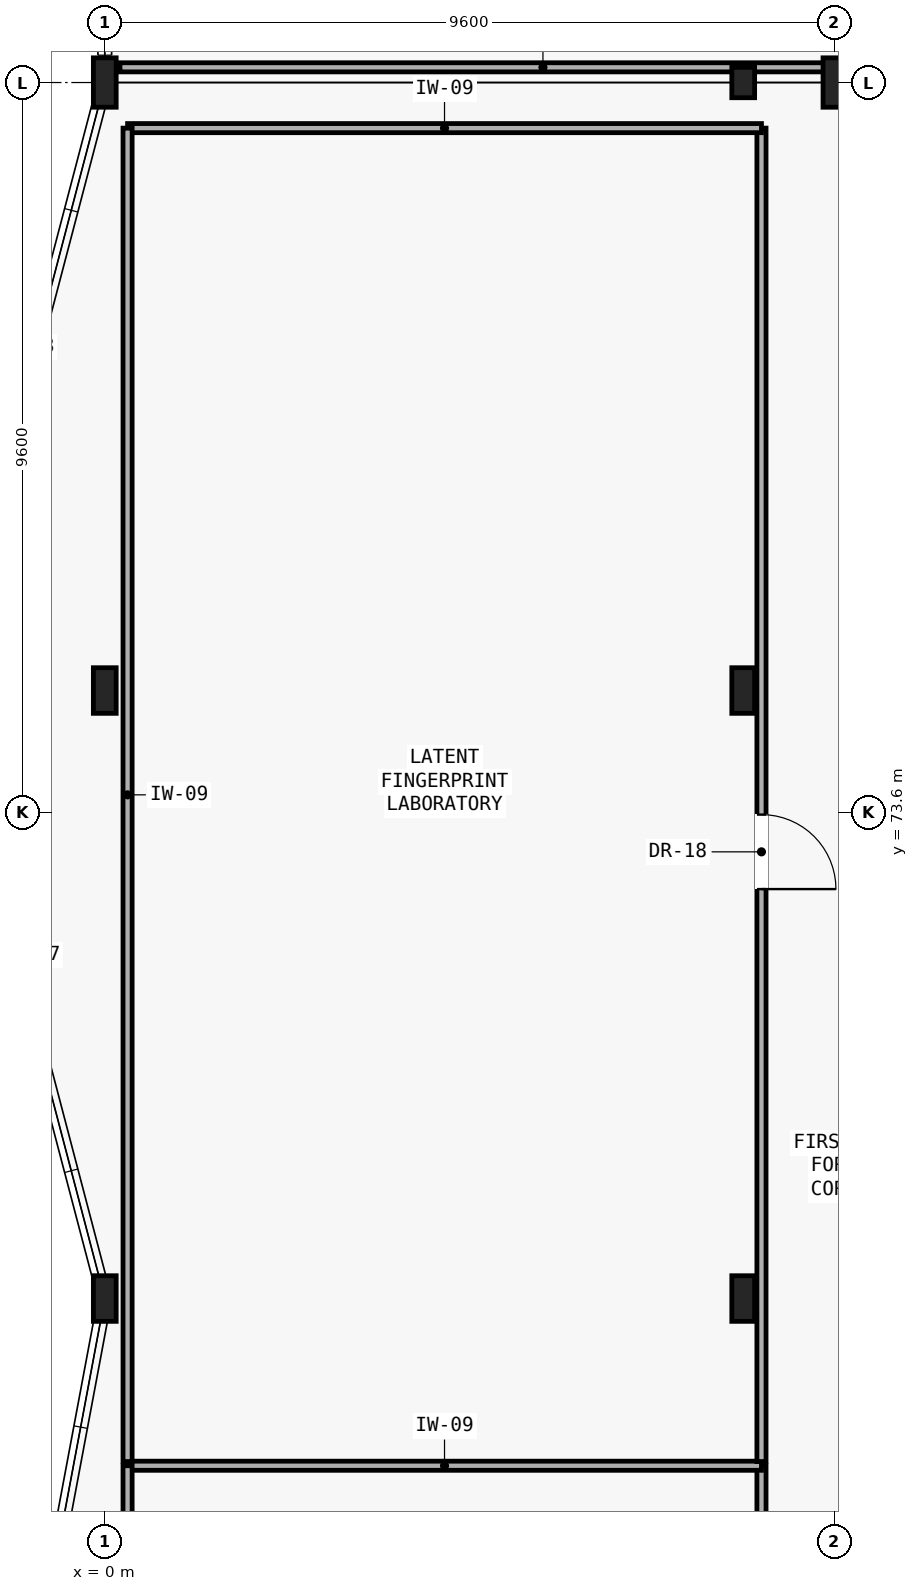
"""IFC4 building model, lengths in metres.
Left out: names, types, materials, properties, quantities, classifications, styles, units other than length and angle.
Written with IfcOpenShell. Run it as: python <this file> out.ifc"""

import sys

from ifc_helpers import new_model, si_unit, direction, frame, frame_2d, origin, origin_2d, place, context, subcontext, project, spatial, rectangle, i_section, extrude, element, fill, save


model = new_model("IFC4")
c1 = context("Model", 3, precision=1e-05, world=origin(), true_north=direction((0.0, 1.0)))
c2 = subcontext(c1, "Body", "Model", "MODEL_VIEW")
j1 = project(units=[si_unit("LENGTHUNIT", "METRE"), si_unit("PLANEANGLEUNIT", "RADIAN")], contexts=[c1])
p1 = place(None, origin())
s1 = spatial("IfcSite", under=j1, at=p1, CompositionType="ELEMENT")
p2 = place(p1, origin())
s2 = spatial("IfcBuilding", under=s1, at=p2, CompositionType="ELEMENT")
p3 = place(p2, frame((0.0, 0.0, 5.25)))
s3 = spatial("IfcBuildingStorey", under=s2, at=p3, CompositionType="ELEMENT", Elevation=5.25)
for number, where, z_axis, x_axis in (
    (1, (0.0, 83.2, 0.0), (0.0, 0.0, 1.0), (1.0, 0.0, 0.0)),
    (2, (9.6, 83.2, 0.0), (0.0, 0.0, 1.0), (1.0, 0.0, 0.0)),
):
    element("IfcColumn", number, at=place(p3, frame(where, z_axis=z_axis, x_axis=x_axis)), inside=s3, PredefinedType="COLUMN", context=c2, shape_type="SweptSolid", body=[
        extrude(i_section(OverallWidth=0.3, OverallDepth=0.65, WebThickness=0.016, FlangeThickness=0.031, FilletRadius=0.027, at=origin_2d()), origin(), (0.0, 0.0, 1.0), 4.2),
    ])
for number, where, z_axis, x_axis in (
    (3, (0.0, 67.2, 0.0), (0.0, 0.0, 1.0), (1.0, 0.0, 0.0)),
    (4, (8.4, 67.2, 0.0), (0.0, 0.0, 1.0), (1.0, 0.0, 0.0)),
    (5, (0.0, 75.2, 0.0), (0.0, 0.0, 1.0), (1.0, 0.0, 0.0)),
    (6, (8.4, 75.2, 0.0), (0.0, 0.0, 1.0), (1.0, 0.0, 0.0)),
):
    element("IfcColumn", number, at=place(p3, frame(where, z_axis=z_axis, x_axis=x_axis)), inside=s3, PredefinedType="COLUMN", context=c2, shape_type="SweptSolid", body=[
        extrude(i_section(OverallWidth=0.3, OverallDepth=0.6, WebThickness=0.015, FlangeThickness=0.03, FilletRadius=0.027, at=origin_2d()), origin(), (0.0, 0.0, 1.0), 4.2),
    ])
p4 = place(p3, frame((8.4, 83.2, 0.0), z_axis=(0.0, 0.0, 1.0), x_axis=(1.0, 0.0, 0.0)))
e7 = element("IfcColumn", 7, at=p4, inside=s3, PredefinedType="COLUMN", context=c2, shape_type="SweptSolid", body=[
    extrude(i_section(OverallWidth=0.3, OverallDepth=0.4, WebThickness=0.013, FlangeThickness=0.024, FilletRadius=0.027, at=origin_2d()), origin(), (0.0, 0.0, 1.0), 4.2),
])
p5 = place(p3, frame((0.2, 83.4, 0.0), z_axis=(0.0, 0.0, 1.0), x_axis=(1.0, 0.0, 0.0)))
e8 = element("IfcWall", 8, at=p5, inside=s3, PredefinedType="PARTITIONING", context=c2, shape_type="SweptSolid", body=[
    extrude(rectangle(XDim=15.9, YDim=0.12, at=frame_2d((7.95, 0.0))), origin(), (0.0, 0.0, 1.0), 3.14),
])
p6 = place(p3, frame((8.64, 48.25, 0.0), z_axis=(0.0, 0.0, 1.0), x_axis=(0.0, 1.0, 0.0)))
e9 = element("IfcWall", 9, at=p6, inside=s3, PredefinedType="PARTITIONING", context=c2, shape_type="SweptSolid", body=[
    extrude(rectangle(XDim=16.75, YDim=0.12, at=frame_2d((8.375, 0.0))), origin(), (0.0, 0.0, 1.0), 3.5),
])
p7 = place(p6, frame((6.865, 0.0, 0.0)))
e10 = element("IfcOpeningElement", 10, at=p7, cuts=e9, PredefinedType="OPENING", context=c2, shape_type="SweptSolid", body=[
    extrude(rectangle(XDim=1.02, YDim=2.1, at=frame_2d((0.51, 1.05))), frame((0.0, 0.07, 0.0), z_axis=(0.0, -1.0, 0.0), x_axis=(1.0, 0.0, 0.0)), (0.0, 0.0, 1.0), 0.14),
])
p8 = place(p3, frame((8.64, 65.0, 0.0), z_axis=(0.0, 0.0, 1.0), x_axis=(-1.0, 0.0, 0.0)))
e11 = element("IfcWall", 11, at=p8, inside=s3, PredefinedType="PARTITIONING", context=c2, shape_type="SweptSolid", body=[
    extrude(rectangle(XDim=8.34, YDim=0.12, at=frame_2d((4.17, 0.0))), origin(), (0.0, 0.0, 1.0), 3.96),
])
p9 = place(p3, frame((0.3, 65.0, 0.0), z_axis=(0.0, 0.0, 1.0), x_axis=(0.0, -1.0, 0.0)))
e12 = element("IfcWall", 12, at=p9, inside=s3, PredefinedType="PARTITIONING", context=c2, shape_type="SweptSolid", body=[
    extrude(rectangle(XDim=16.75, YDim=0.12, at=frame_2d((8.375, 0.0))), origin(), (0.0, 0.0, 1.0), 3.96),
])
p10 = place(p3, frame((8.64, 65.055, 0.0), z_axis=(0.0, 0.0, 1.0), x_axis=(0.0, 1.0, 0.0)))
e13 = element("IfcWall", 13, at=p10, inside=s3, PredefinedType="PARTITIONING", context=c2, shape_type="SweptSolid", body=[
    extrude(rectangle(XDim=17.545, YDim=0.12, at=frame_2d((8.772, 0.0))), origin(), (0.0, 0.0, 1.0), 3.5),
])
p11 = place(p10, frame((7.532, 0.0, 0.0)))
e14 = element("IfcOpeningElement", 14, at=p11, cuts=e13, PredefinedType="OPENING", context=c2, shape_type="SweptSolid", body=[
    extrude(rectangle(XDim=0.98, YDim=2.1, at=frame_2d((0.49, 1.05))), frame((0.0, 0.07, 0.0), z_axis=(0.0, -1.0, 0.0), x_axis=(1.0, 0.0, 0.0)), (0.0, 0.0, 1.0), 0.14),
])
p12 = place(p3, frame((8.64, 82.6, 0.0), z_axis=(0.0, 0.0, 1.0), x_axis=(-1.0, 0.0, 0.0)))
e15 = element("IfcWall", 15, at=p12, inside=s3, PredefinedType="PARTITIONING", context=c2, shape_type="SweptSolid", body=[
    extrude(rectangle(XDim=8.34, YDim=0.12, at=frame_2d((4.17, 0.0))), origin(), (0.0, 0.0, 1.0), 3.96),
])
p13 = place(p3, frame((0.3, 82.6, 0.0), z_axis=(0.0, 0.0, 1.0), x_axis=(0.0, -1.0, 0.0)))
e16 = element("IfcWall", 16, at=p13, inside=s3, PredefinedType="PARTITIONING", context=c2, shape_type="SweptSolid", body=[
    extrude(rectangle(XDim=17.545, YDim=0.12, at=frame_2d((8.772, 0.0))), origin(), (0.0, 0.0, 1.0), 3.96),
])
p14 = place(p11, frame((0.98, 0.0, 0.0), z_axis=(0.0, 0.0, 1.0), x_axis=(-1.0, 0.0, 0.0)))
e17 = element("IfcDoor", 17, at=p14, inside=s3, OperationType="SINGLE_SWING_LEFT", PredefinedType="DOOR", context=c2, shape_type="SweptSolid", body=[
    extrude(rectangle(XDim=0.98, YDim=2.1, at=frame_2d((0.49, 1.05))), frame((0.0, 0.025, 0.0), z_axis=(0.0, -1.0, 0.0), x_axis=(1.0, 0.0, 0.0)), (0.0, 0.0, 1.0), 0.05),
])
fill(e14, e17)
save(model, sys.argv[1])
